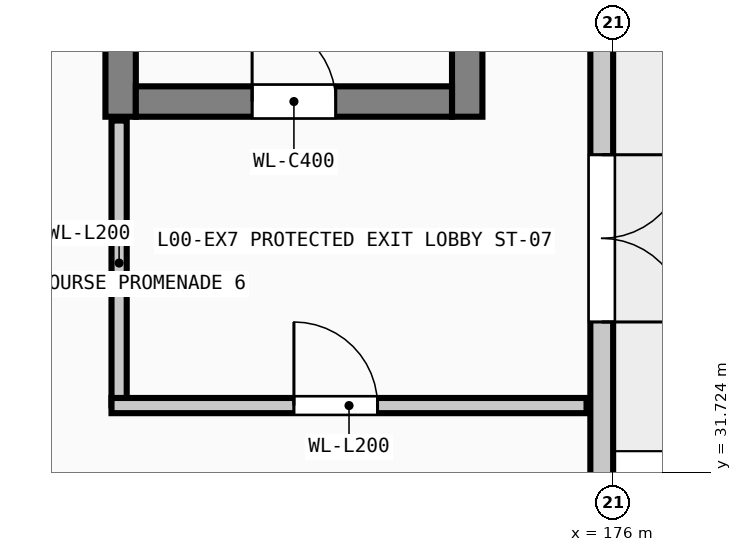
"""IFC4 building model, lengths in metres.
Left out: names, types, materials, properties, quantities, classifications, styles, units other than length and angle.
Written with IfcOpenShell. Run it as: python <this file> out.ifc"""

import sys

from ifc_helpers import new_model, si_unit, direction, frame, frame_2d, origin, place, context, subcontext, project, spatial, rectangle, extrude, element, fill, save


model = new_model("IFC4")
c1 = context("Model", 3, precision=1e-05, world=origin(), true_north=direction((0.0, 1.0)))
c2 = subcontext(c1, "Body", "Model", "MODEL_VIEW")
j1 = project(units=[si_unit("LENGTHUNIT", "METRE"), si_unit("PLANEANGLEUNIT", "RADIAN")], contexts=[c1])
p1 = place(None, origin())
s1 = spatial("IfcSite", under=j1, at=p1, CompositionType="ELEMENT")
p2 = place(p1, origin())
s2 = spatial("IfcBuilding", under=s1, at=p2, CompositionType="ELEMENT")
p3 = place(p2, origin())
s3 = spatial("IfcBuildingStorey", under=s2, at=p3, CompositionType="ELEMENT", Elevation=0.0)
for number, where, z_axis, x_axis in (
    (1, (169.52, 36.4, 0.0), (0.0, 0.0, 1.0), (0.0, 1.0, 0.0)),
    (2, (174.08, 45.6, 0.0), (0.0, 0.0, 1.0), (0.0, -1.0, 0.0)),
):
    element("IfcWall", number, at=place(p3, frame(where, z_axis=z_axis, x_axis=x_axis)), inside=s3, PredefinedType="SHEAR", context=c2, shape_type="SweptSolid", body=[
        extrude(rectangle(XDim=9.2, YDim=0.4, at=frame_2d((4.6, 0.0))), origin(), (0.0, 0.0, 1.0), 4.575),
    ])
p4 = place(p3, frame((173.88, 36.6, 0.0), z_axis=(0.0, 0.0, 1.0), x_axis=(-1.0, 0.0, 0.0)))
e3 = element("IfcWall", 3, at=p4, inside=s3, PredefinedType="SHEAR", context=c2, shape_type="SweptSolid", body=[
    extrude(rectangle(XDim=4.16, YDim=0.4, at=frame_2d((2.08, 0.0))), origin(), (0.0, 0.0, 1.0), 4.575),
])
p5 = place(p4, frame((1.53, 0.0, 0.0)))
e4 = element("IfcOpeningElement", 4, at=p5, cuts=e3, PredefinedType="OPENING", context=c2, shape_type="SweptSolid", body=[
    extrude(rectangle(XDim=1.1, YDim=2.2, at=frame_2d((0.55, 1.1))), frame((0.0, 0.21, 0.0), z_axis=(0.0, -1.0, 0.0), x_axis=(1.0, 0.0, 0.0)), (0.0, 0.0, 1.0), 0.42),
])
p6 = place(p3, frame((169.5, 32.6, 0.0), z_axis=(0.0, 0.0, 1.0), x_axis=(0.0, 1.0, 0.0)))
e5 = element("IfcWall", 5, at=p6, inside=s3, PredefinedType="SOLIDWALL", context=c2, shape_type="SweptSolid", body=[
    extrude(rectangle(XDim=3.75, YDim=0.2, at=frame_2d((1.875, 0.0))), origin(), (0.0, 0.0, 1.0), 4.525),
])
p7 = place(p3, frame((169.4, 32.6, 0.0), z_axis=(0.0, 0.0, 1.0), x_axis=(1.0, 0.0, 0.0)))
e6 = element("IfcWall", 6, at=p7, inside=s3, PredefinedType="SOLIDWALL", context=c2, shape_type="SweptSolid", body=[
    extrude(rectangle(XDim=6.25, YDim=0.2, at=frame_2d((3.125, 0.0))), origin(), (0.0, 0.0, 1.0), 4.525),
])
p8 = place(p7, frame((2.4, 0.0, 0.0)))
e7 = element("IfcOpeningElement", 7, at=p8, cuts=e6, PredefinedType="OPENING", context=c2, shape_type="SweptSolid", body=[
    extrude(rectangle(XDim=1.1, YDim=2.2, at=frame_2d((0.55, 1.1))), frame((0.0, 0.11, 0.0), z_axis=(0.0, -1.0, 0.0), x_axis=(1.0, 0.0, 0.0)), (0.0, 0.0, 1.0), 0.22),
])
p9 = place(p3, frame((175.85, 38.075, 0.0), z_axis=(0.0, 0.0, 1.0), x_axis=(0.0, -1.0, 0.0)))
e8 = element("IfcWall", 8, at=p9, inside=s3, PredefinedType="SOLIDWALL", context=c2, shape_type="SweptSolid", body=[
    extrude(rectangle(XDim=6.55, YDim=0.3, at=frame_2d((3.275, 0.0))), origin(), (0.0, 0.0, 1.0), 4.2),
])
p10 = place(p9, frame((2.175, 0.0, 0.0)))
e9 = element("IfcOpeningElement", 9, at=p10, cuts=e8, PredefinedType="OPENING", context=c2, shape_type="SweptSolid", body=[
    extrude(rectangle(XDim=2.2, YDim=2.4, at=frame_2d((1.1, 1.2))), frame((0.0, 0.16, 0.0), z_axis=(0.0, -1.0, 0.0), x_axis=(1.0, 0.0, 0.0)), (0.0, 0.0, 1.0), 0.32),
])
p11 = place(p5, frame((1.1, 0.0, 0.0), z_axis=(0.0, 0.0, 1.0), x_axis=(-1.0, 0.0, 0.0)))
e10 = element("IfcDoor", 10, at=p11, inside=s3, OperationType="SINGLE_SWING_LEFT", PredefinedType="DOOR", context=c2, shape_type="SweptSolid", body=[
    extrude(rectangle(XDim=1.1, YDim=2.2, at=frame_2d((0.55, 1.1))), frame((0.0, 0.025, 0.0), z_axis=(0.0, -1.0, 0.0), x_axis=(1.0, 0.0, 0.0)), (0.0, 0.0, 1.0), 0.05),
])
fill(e4, e10)
p12 = place(p8, origin())
e11 = element("IfcDoor", 11, at=p12, inside=s3, OperationType="SINGLE_SWING_LEFT", PredefinedType="DOOR", context=c2, shape_type="SweptSolid", body=[
    extrude(rectangle(XDim=1.1, YDim=2.2, at=frame_2d((0.55, 1.1))), frame((0.0, 0.025, 0.0), z_axis=(0.0, -1.0, 0.0), x_axis=(1.0, 0.0, 0.0)), (0.0, 0.0, 1.0), 0.05),
])
fill(e7, e11)
p13 = place(p10, origin())
e12 = element("IfcDoor", 12, at=p13, inside=s3, OperationType="DOUBLE_DOOR_SINGLE_SWING", PredefinedType="DOOR", context=c2, shape_type="SweptSolid", body=[
    extrude(rectangle(XDim=2.2, YDim=2.4, at=frame_2d((1.1, 1.2))), frame((0.0, 0.025, 0.0), z_axis=(0.0, -1.0, 0.0), x_axis=(1.0, 0.0, 0.0)), (0.0, 0.0, 1.0), 0.05),
])
fill(e9, e12)
save(model, sys.argv[1])
